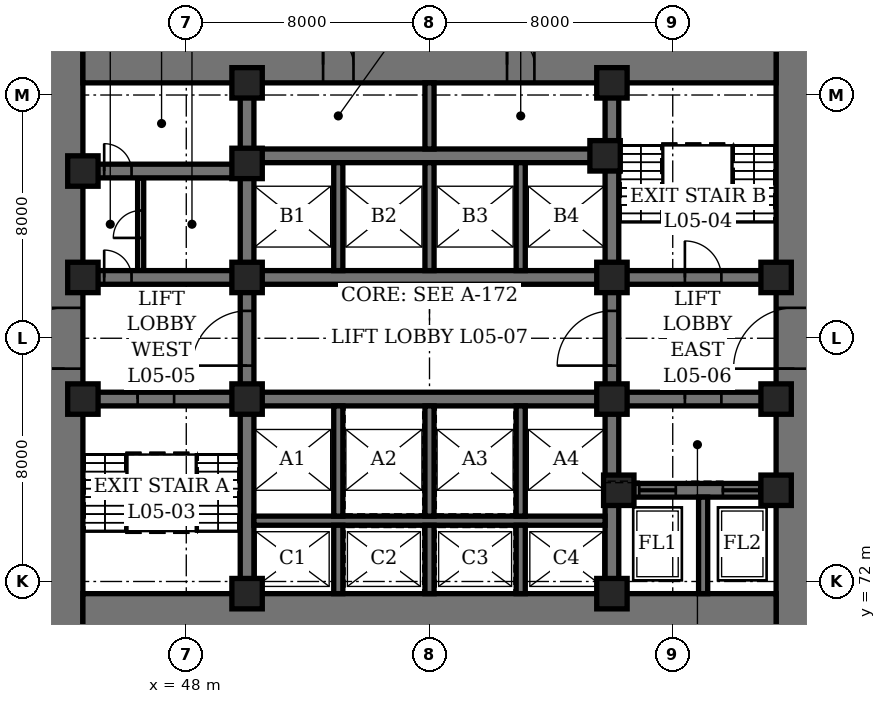
"""IFC4 building model, lengths in metres.
Left out: names, types, materials, properties, quantities, classifications, styles, units other than length and angle.
Written with IfcOpenShell. Run it as: python <this file> out.ifc"""

import sys

from ifc_helpers import new_model, si_unit, direction, frame, frame_2d, origin, origin_2d, place, context, subcontext, project, spatial, rectangle, hollow_rectangle, extrude, element, fill, save


model = new_model("IFC4")
c1 = context("Model", 3, precision=1e-05, world=origin(), true_north=direction((0.0, 1.0)))
c2 = subcontext(c1, "Body", "Model", "MODEL_VIEW")
j1 = project(units=[si_unit("LENGTHUNIT", "METRE"), si_unit("PLANEANGLEUNIT", "RADIAN")], contexts=[c1])
p1 = place(None, origin())
s1 = spatial("IfcSite", under=j1, at=p1, CompositionType="ELEMENT")
p2 = place(p1, origin())
s2 = spatial("IfcBuilding", under=s1, at=p2, CompositionType="ELEMENT")
p3 = place(p2, frame((0.0, 0.0, 25.9)))
s3 = spatial("IfcBuildingStorey", under=s2, at=p3, CompositionType="ELEMENT", Elevation=25.9)
p4 = place(p3, frame((44.0, 70.4, 0.0), z_axis=(0.0, 0.0, 1.0), x_axis=(0.0, 1.0, 0.0)))
e1 = element("IfcWall", 1, at=p4, inside=s3, PredefinedType="SHEAR", context=c2, shape_type="SweptSolid", body=[
    extrude(rectangle(XDim=19.2, YDim=1.2, at=frame_2d((9.6, 0.0))), origin(), (0.0, 0.0, 1.0), 9.0),
])
p5 = place(p4, frame((8.6, 0.0, 0.0)))
e2 = element("IfcOpeningElement", 2, at=p5, cuts=e1, PredefinedType="OPENING", context=c2, shape_type="SweptSolid", body=[
    extrude(rectangle(XDim=2.0, YDim=2.4, at=frame_2d((1.0, 1.2))), frame((0.0, 0.61, 0.0), z_axis=(0.0, -1.0, 0.0), x_axis=(1.0, 0.0, 0.0)), (0.0, 0.0, 1.0), 1.22),
])
p6 = place(p3, frame((68.0, 70.4, 0.0), z_axis=(0.0, 0.0, 1.0), x_axis=(0.0, 1.0, 0.0)))
e3 = element("IfcWall", 3, at=p6, inside=s3, PredefinedType="SHEAR", context=c2, shape_type="SweptSolid", body=[
    extrude(rectangle(XDim=19.2, YDim=1.2, at=frame_2d((9.6, 0.0))), origin(), (0.0, 0.0, 1.0), 9.0),
])
p7 = place(p6, frame((8.6, 0.0, 0.0)))
e4 = element("IfcOpeningElement", 4, at=p7, cuts=e3, PredefinedType="OPENING", context=c2, shape_type="SweptSolid", body=[
    extrude(rectangle(XDim=2.0, YDim=2.4, at=frame_2d((1.0, 1.2))), frame((0.0, 0.61, 0.0), z_axis=(0.0, -1.0, 0.0), x_axis=(1.0, 0.0, 0.0)), (0.0, 0.0, 1.0), 1.22),
])
p8 = place(p3, frame((44.6, 71.0, 0.0), z_axis=(0.0, 0.0, 1.0), x_axis=(1.0, 0.0, 0.0)))
e5 = element("IfcWall", 5, at=p8, inside=s3, PredefinedType="SHEAR", context=c2, shape_type="SweptSolid", body=[
    extrude(rectangle(XDim=22.8, YDim=1.2, at=frame_2d((11.4, 0.0))), origin(), (0.0, 0.0, 1.0), 9.0),
])
p9 = place(p3, frame((44.6, 89.0, 0.0), z_axis=(0.0, 0.0, 1.0), x_axis=(1.0, 0.0, 0.0)))
e6 = element("IfcWall", 6, at=p9, inside=s3, PredefinedType="SHEAR", context=c2, shape_type="SweptSolid", body=[
    extrude(rectangle(XDim=22.8, YDim=1.2, at=frame_2d((11.4, 0.0))), origin(), (0.0, 0.0, 1.0), 9.0),
])
p10 = place(p9, frame((7.9, 0.0, 0.0)))
e7 = element("IfcOpeningElement", 7, at=p10, cuts=e6, PredefinedType="OPENING", context=c2, shape_type="SweptSolid", body=[
    extrude(rectangle(XDim=1.0, YDim=2.1, at=frame_2d((0.5, 1.05))), frame((0.0, 0.61, 0.0), z_axis=(0.0, -1.0, 0.0), x_axis=(1.0, 0.0, 0.0)), (0.0, 0.0, 1.0), 1.22),
])
p11 = place(p9, frame((13.95, 0.0, 0.0)))
e8 = element("IfcOpeningElement", 8, at=p11, cuts=e6, PredefinedType="OPENING", context=c2, shape_type="SweptSolid", body=[
    extrude(rectangle(XDim=0.9, YDim=2.1, at=frame_2d((0.45, 1.05))), frame((0.0, 0.61, 0.0), z_axis=(0.0, -1.0, 0.0), x_axis=(1.0, 0.0, 0.0)), (0.0, 0.0, 1.0), 1.22),
])
p12 = place(p3, frame((50.0, 71.6, 0.0), z_axis=(0.0, 0.0, 1.0), x_axis=(0.0, 1.0, 0.0)))
e9 = element("IfcWall", 9, at=p12, inside=s3, PredefinedType="SHEAR", context=c2, shape_type="SweptSolid", body=[
    extrude(rectangle(XDim=16.8, YDim=0.45, at=frame_2d((8.4, 0.0))), origin(), (0.0, 0.0, 1.0), 9.0),
])
p13 = place(p12, frame((7.5, 0.0, 0.0)))
e10 = element("IfcOpeningElement", 10, at=p13, cuts=e9, PredefinedType="OPENING", context=c2, shape_type="SweptSolid", body=[
    extrude(rectangle(XDim=1.8, YDim=2.4, at=frame_2d((0.9, 1.2))), frame((0.0, 0.235, 0.0), z_axis=(0.0, -1.0, 0.0), x_axis=(1.0, 0.0, 0.0)), (0.0, 0.0, 1.0), 0.47),
])
p14 = place(p3, frame((62.0, 71.6, 0.0), z_axis=(0.0, 0.0, 1.0), x_axis=(0.0, 1.0, 0.0)))
e11 = element("IfcWall", 11, at=p14, inside=s3, PredefinedType="SHEAR", context=c2, shape_type="SweptSolid", body=[
    extrude(rectangle(XDim=16.8, YDim=0.45, at=frame_2d((8.4, 0.0))), origin(), (0.0, 0.0, 1.0), 9.0),
])
p15 = place(p14, frame((7.5, 0.0, 0.0)))
e12 = element("IfcOpeningElement", 12, at=p15, cuts=e11, PredefinedType="OPENING", context=c2, shape_type="SweptSolid", body=[
    extrude(rectangle(XDim=1.8, YDim=2.4, at=frame_2d((0.9, 1.2))), frame((0.0, 0.235, 0.0), z_axis=(0.0, -1.0, 0.0), x_axis=(1.0, 0.0, 0.0)), (0.0, 0.0, 1.0), 0.47),
])
p16 = place(p3, frame((44.6, 78.0, 0.0), z_axis=(0.0, 0.0, 1.0), x_axis=(1.0, 0.0, 0.0)))
e13 = element("IfcWall", 13, at=p16, inside=s3, PredefinedType="SHEAR", context=c2, shape_type="SweptSolid", body=[
    extrude(rectangle(XDim=5.175, YDim=0.45, at=frame_2d((2.587, 0.0))), origin(), (0.0, 0.0, 1.0), 9.0),
])
p17 = place(p16, frame((1.8, 0.0, 0.0)))
e14 = element("IfcOpeningElement", 14, at=p17, cuts=e13, PredefinedType="OPENING", context=c2, shape_type="SweptSolid", body=[
    extrude(rectangle(XDim=1.2, YDim=2.1, at=frame_2d((0.6, 1.05))), frame((0.0, 0.235, 0.0), z_axis=(0.0, -1.0, 0.0), x_axis=(1.0, 0.0, 0.0)), (0.0, 0.0, 1.0), 0.47),
])
p18 = place(p3, frame((44.6, 82.0, 0.0), z_axis=(0.0, 0.0, 1.0), x_axis=(1.0, 0.0, 0.0)))
e15 = element("IfcWall", 15, at=p18, inside=s3, PredefinedType="SHEAR", context=c2, shape_type="SweptSolid", body=[
    extrude(rectangle(XDim=5.175, YDim=0.45, at=frame_2d((2.587, 0.0))), origin(), (0.0, 0.0, 1.0), 9.0),
])
p19 = place(p18, frame((0.7, 0.0, 0.0)))
e16 = element("IfcOpeningElement", 16, at=p19, cuts=e15, PredefinedType="OPENING", context=c2, shape_type="SweptSolid", body=[
    extrude(rectangle(XDim=0.9, YDim=2.1, at=frame_2d((0.45, 1.05))), frame((0.0, 0.235, 0.0), z_axis=(0.0, -1.0, 0.0), x_axis=(1.0, 0.0, 0.0)), (0.0, 0.0, 1.0), 0.47),
])
p20 = place(p3, frame((44.6, 85.5, 0.0), z_axis=(0.0, 0.0, 1.0), x_axis=(1.0, 0.0, 0.0)))
e17 = element("IfcWall", 17, at=p20, inside=s3, PredefinedType="SHEAR", context=c2, shape_type="SweptSolid", body=[
    extrude(rectangle(XDim=5.175, YDim=0.45, at=frame_2d((2.587, 0.0))), origin(), (0.0, 0.0, 1.0), 9.0),
])
p21 = place(p20, frame((0.7, 0.0, 0.0)))
e18 = element("IfcOpeningElement", 18, at=p21, cuts=e17, PredefinedType="OPENING", context=c2, shape_type="SweptSolid", body=[
    extrude(rectangle(XDim=0.9, YDim=2.1, at=frame_2d((0.45, 1.05))), frame((0.0, 0.235, 0.0), z_axis=(0.0, -1.0, 0.0), x_axis=(1.0, 0.0, 0.0)), (0.0, 0.0, 1.0), 0.47),
])
p22 = place(p3, frame((62.225, 75.0, 0.0), z_axis=(0.0, 0.0, 1.0), x_axis=(1.0, 0.0, 0.0)))
e19 = element("IfcWall", 19, at=p22, inside=s3, PredefinedType="SHEAR", context=c2, shape_type="SweptSolid", body=[
    extrude(rectangle(XDim=5.175, YDim=0.45, at=frame_2d((2.587, 0.0))), origin(), (0.0, 0.0, 1.0), 9.0),
])
p23 = place(p22, frame((0.675, 0.0, 0.0)))
e20 = element("IfcOpeningElement", 20, at=p23, cuts=e19, PredefinedType="OPENING", context=c2, shape_type="SweptSolid", body=[
    extrude(rectangle(XDim=1.2, YDim=2.2, at=frame_2d((0.6, 1.1))), frame((0.0, 0.235, 0.0), z_axis=(0.0, -1.0, 0.0), x_axis=(1.0, 0.0, 0.0)), (0.0, 0.0, 1.0), 0.47),
])
p24 = place(p22, frame((3.425, 0.0, 0.0)))
e21 = element("IfcOpeningElement", 21, at=p24, cuts=e19, PredefinedType="OPENING", context=c2, shape_type="SweptSolid", body=[
    extrude(rectangle(XDim=1.2, YDim=2.2, at=frame_2d((0.6, 1.1))), frame((0.0, 0.235, 0.0), z_axis=(0.0, -1.0, 0.0), x_axis=(1.0, 0.0, 0.0)), (0.0, 0.0, 1.0), 0.47),
])
p25 = place(p3, frame((62.225, 78.0, 0.0), z_axis=(0.0, 0.0, 1.0), x_axis=(1.0, 0.0, 0.0)))
e22 = element("IfcWall", 22, at=p25, inside=s3, PredefinedType="SHEAR", context=c2, shape_type="SweptSolid", body=[
    extrude(rectangle(XDim=5.175, YDim=0.45, at=frame_2d((2.587, 0.0))), origin(), (0.0, 0.0, 1.0), 9.0),
])
p26 = place(p25, frame((2.175, 0.0, 0.0)))
e23 = element("IfcOpeningElement", 23, at=p26, cuts=e22, PredefinedType="OPENING", context=c2, shape_type="SweptSolid", body=[
    extrude(rectangle(XDim=1.2, YDim=2.1, at=frame_2d((0.6, 1.05))), frame((0.0, 0.235, 0.0), z_axis=(0.0, -1.0, 0.0), x_axis=(1.0, 0.0, 0.0)), (0.0, 0.0, 1.0), 0.47),
])
p27 = place(p3, frame((62.225, 82.0, 0.0), z_axis=(0.0, 0.0, 1.0), x_axis=(1.0, 0.0, 0.0)))
e24 = element("IfcWall", 24, at=p27, inside=s3, PredefinedType="SHEAR", context=c2, shape_type="SweptSolid", body=[
    extrude(rectangle(XDim=5.175, YDim=0.45, at=frame_2d((2.587, 0.0))), origin(), (0.0, 0.0, 1.0), 9.0),
])
p28 = place(p27, frame((2.175, 0.0, 0.0)))
e25 = element("IfcOpeningElement", 25, at=p28, cuts=e24, PredefinedType="OPENING", context=c2, shape_type="SweptSolid", body=[
    extrude(rectangle(XDim=1.2, YDim=2.1, at=frame_2d((0.6, 1.05))), frame((0.0, 0.235, 0.0), z_axis=(0.0, -1.0, 0.0), x_axis=(1.0, 0.0, 0.0)), (0.0, 0.0, 1.0), 0.47),
])
for number, where, z_axis, x_axis in (
    (26, (50.225, 78.0, 0.0), (0.0, 0.0, 1.0), (1.0, 0.0, 0.0)),
    (27, (50.225, 82.0, 0.0), (0.0, 0.0, 1.0), (1.0, 0.0, 0.0)),
    (28, (50.225, 86.0, 0.0), (0.0, 0.0, 1.0), (1.0, 0.0, 0.0)),
):
    element("IfcWall", number, at=place(p3, frame(where, z_axis=z_axis, x_axis=x_axis)), inside=s3, PredefinedType="SHEAR", context=c2, shape_type="SweptSolid", body=[
        extrude(rectangle(XDim=11.55, YDim=0.45, at=frame_2d((5.775, 0.0))), origin(), (0.0, 0.0, 1.0), 9.0),
    ])
p29 = place(p3, frame((50.225, 74.0, 0.0), z_axis=(0.0, 0.0, 1.0), x_axis=(1.0, 0.0, 0.0)))
e29 = element("IfcWall", 29, at=p29, inside=s3, PredefinedType="SHEAR", context=c2, shape_type="SweptSolid", body=[
    extrude(rectangle(XDim=11.55, YDim=0.3, at=frame_2d((5.775, 0.0))), origin(), (0.0, 0.0, 1.0), 9.0),
])
p30 = place(p3, frame((53.0, 71.6, 0.0), z_axis=(0.0, 0.0, 1.0), x_axis=(0.0, 1.0, 0.0)))
e30 = element("IfcWall", 30, at=p30, inside=s3, PredefinedType="SHEAR", context=c2, shape_type="SweptSolid", body=[
    extrude(rectangle(XDim=2.25, YDim=0.3, at=frame_2d((1.125, 0.0))), origin(), (0.0, 0.0, 1.0), 9.0),
])
p31 = place(p3, frame((53.0, 74.15, 0.0), z_axis=(0.0, 0.0, 1.0), x_axis=(0.0, 1.0, 0.0)))
e31 = element("IfcWall", 31, at=p31, inside=s3, PredefinedType="SHEAR", context=c2, shape_type="SweptSolid", body=[
    extrude(rectangle(XDim=3.625, YDim=0.3, at=frame_2d((1.812, 0.0))), origin(), (0.0, 0.0, 1.0), 9.0),
])
p32 = place(p3, frame((53.0, 82.225, 0.0), z_axis=(0.0, 0.0, 1.0), x_axis=(0.0, 1.0, 0.0)))
e32 = element("IfcWall", 32, at=p32, inside=s3, PredefinedType="SHEAR", context=c2, shape_type="SweptSolid", body=[
    extrude(rectangle(XDim=3.55, YDim=0.3, at=frame_2d((1.775, 0.0))), origin(), (0.0, 0.0, 1.0), 9.0),
])
p33 = place(p3, frame((56.0, 71.6, 0.0), z_axis=(0.0, 0.0, 1.0), x_axis=(0.0, 1.0, 0.0)))
e33 = element("IfcWall", 33, at=p33, inside=s3, PredefinedType="SHEAR", context=c2, shape_type="SweptSolid", body=[
    extrude(rectangle(XDim=2.25, YDim=0.3, at=frame_2d((1.125, 0.0))), origin(), (0.0, 0.0, 1.0), 9.0),
])
p34 = place(p3, frame((56.0, 74.15, 0.0), z_axis=(0.0, 0.0, 1.0), x_axis=(0.0, 1.0, 0.0)))
e34 = element("IfcWall", 34, at=p34, inside=s3, PredefinedType="SHEAR", context=c2, shape_type="SweptSolid", body=[
    extrude(rectangle(XDim=3.625, YDim=0.3, at=frame_2d((1.812, 0.0))), origin(), (0.0, 0.0, 1.0), 9.0),
])
p35 = place(p3, frame((56.0, 82.225, 0.0), z_axis=(0.0, 0.0, 1.0), x_axis=(0.0, 1.0, 0.0)))
e35 = element("IfcWall", 35, at=p35, inside=s3, PredefinedType="SHEAR", context=c2, shape_type="SweptSolid", body=[
    extrude(rectangle(XDim=3.55, YDim=0.3, at=frame_2d((1.775, 0.0))), origin(), (0.0, 0.0, 1.0), 9.0),
])
p36 = place(p3, frame((59.0, 71.6, 0.0), z_axis=(0.0, 0.0, 1.0), x_axis=(0.0, 1.0, 0.0)))
e36 = element("IfcWall", 36, at=p36, inside=s3, PredefinedType="SHEAR", context=c2, shape_type="SweptSolid", body=[
    extrude(rectangle(XDim=2.25, YDim=0.3, at=frame_2d((1.125, 0.0))), origin(), (0.0, 0.0, 1.0), 9.0),
])
p37 = place(p3, frame((59.0, 74.15, 0.0), z_axis=(0.0, 0.0, 1.0), x_axis=(0.0, 1.0, 0.0)))
e37 = element("IfcWall", 37, at=p37, inside=s3, PredefinedType="SHEAR", context=c2, shape_type="SweptSolid", body=[
    extrude(rectangle(XDim=3.625, YDim=0.3, at=frame_2d((1.812, 0.0))), origin(), (0.0, 0.0, 1.0), 9.0),
])
p38 = place(p3, frame((59.0, 82.225, 0.0), z_axis=(0.0, 0.0, 1.0), x_axis=(0.0, 1.0, 0.0)))
e38 = element("IfcWall", 38, at=p38, inside=s3, PredefinedType="SHEAR", context=c2, shape_type="SweptSolid", body=[
    extrude(rectangle(XDim=3.55, YDim=0.3, at=frame_2d((1.775, 0.0))), origin(), (0.0, 0.0, 1.0), 9.0),
])
p39 = place(p3, frame((65.0, 71.6, 0.0), z_axis=(0.0, 0.0, 1.0), x_axis=(0.0, 1.0, 0.0)))
e39 = element("IfcWall", 39, at=p39, inside=s3, PredefinedType="SHEAR", context=c2, shape_type="SweptSolid", body=[
    extrude(rectangle(XDim=3.175, YDim=0.3, at=frame_2d((1.587, 0.0))), origin(), (0.0, 0.0, 1.0), 9.0),
])
p40 = place(p3, frame((56.0, 86.225, 0.0), z_axis=(0.0, 0.0, 1.0), x_axis=(0.0, 1.0, 0.0)))
e40 = element("IfcWall", 40, at=p40, inside=s3, PredefinedType="SHEAR", context=c2, shape_type="SweptSolid", body=[
    extrude(rectangle(XDim=2.175, YDim=0.3, at=frame_2d((1.087, 0.0))), origin(), (0.0, 0.0, 1.0), 9.0),
])
for number, where, z_axis, x_axis in (
    (41, (44.6, 78.0, 0.0), (0.0, 0.0, 1.0), (1.0, 0.0, 0.0)),
    (42, (44.6, 82.0, 0.0), (0.0, 0.0, 1.0), (1.0, 0.0, 0.0)),
    (43, (44.6, 85.5, 0.0), (0.0, 0.0, 1.0), (1.0, 0.0, 0.0)),
    (44, (50.0, 71.6, 0.0), (0.0, 0.0, 1.0), (1.0, 0.0, 0.0)),
    (45, (50.0, 78.0, 0.0), (0.0, 0.0, 1.0), (1.0, 0.0, 0.0)),
    (46, (50.0, 82.0, 0.0), (0.0, 0.0, 1.0), (1.0, 0.0, 0.0)),
    (47, (50.0, 85.75, 0.0), (0.0, 0.0, 1.0), (1.0, 0.0, 0.0)),
    (48, (50.0, 88.4, 0.0), (0.0, 0.0, 1.0), (1.0, 0.0, 0.0)),
    (49, (61.775, 86.0, 0.0), (0.0, 0.0, 1.0), (1.0, 0.0, 0.0)),
    (50, (62.0, 71.6, 0.0), (0.0, 0.0, 1.0), (1.0, 0.0, 0.0)),
    (51, (62.0, 78.0, 0.0), (0.0, 0.0, 1.0), (1.0, 0.0, 0.0)),
    (52, (62.0, 82.0, 0.0), (0.0, 0.0, 1.0), (1.0, 0.0, 0.0)),
    (53, (62.0, 88.4, 0.0), (0.0, 0.0, 1.0), (1.0, 0.0, 0.0)),
    (54, (62.225, 75.0, 0.0), (0.0, 0.0, 1.0), (1.0, 0.0, 0.0)),
    (55, (67.4, 75.0, 0.0), (0.0, 0.0, 1.0), (1.0, 0.0, 0.0)),
    (56, (67.4, 78.0, 0.0), (0.0, 0.0, 1.0), (1.0, 0.0, 0.0)),
    (57, (67.4, 82.0, 0.0), (0.0, 0.0, 1.0), (1.0, 0.0, 0.0)),
):
    element("IfcColumn", number, at=place(p3, frame(where, z_axis=z_axis, x_axis=x_axis)), inside=s3, PredefinedType="COLUMN", context=c2, shape_type="SweptSolid", body=[
        extrude(hollow_rectangle(XDim=1.0, YDim=1.0, WallThickness=0.15, at=origin_2d()), origin(), (0.0, 0.0, 1.0), 9.0),
    ])
p41 = place(p3, frame((46.5, 82.225, 0.0), z_axis=(0.0, 0.0, 1.0), x_axis=(0.0, 1.0, 0.0)))
e58 = element("IfcWall", 58, at=p41, inside=s3, PredefinedType="PARTITIONING", context=c2, shape_type="SweptSolid", body=[
    extrude(rectangle(XDim=3.05, YDim=0.2, at=frame_2d((1.525, 0.0))), origin(), (0.0, 0.0, 1.0), 8.7),
])
p42 = place(p41, frame((1.075, 0.0, 0.0)))
e59 = element("IfcOpeningElement", 59, at=p42, cuts=e58, PredefinedType="OPENING", context=c2, shape_type="SweptSolid", body=[
    extrude(rectangle(XDim=0.9, YDim=2.1, at=frame_2d((0.45, 1.05))), frame((0.0, 0.11, 0.0), z_axis=(0.0, -1.0, 0.0), x_axis=(1.0, 0.0, 0.0)), (0.0, 0.0, 1.0), 0.22),
])
p43 = place(p19, origin())
e60 = element("IfcDoor", 60, at=p43, inside=s3, OperationType="SINGLE_SWING_LEFT", PredefinedType="DOOR", context=c2, shape_type="SweptSolid", body=[
    extrude(rectangle(XDim=0.9, YDim=2.1, at=frame_2d((0.45, 1.05))), frame((0.0, 0.225, 0.0), z_axis=(0.0, -1.0, 0.0), x_axis=(1.0, 0.0, 0.0)), (0.0, 0.0, 1.0), 0.449),
])
fill(e16, e60)
p44 = place(p42, origin())
e61 = element("IfcDoor", 61, at=p44, inside=s3, OperationType="SINGLE_SWING_RIGHT", PredefinedType="DOOR", context=c2, shape_type="SweptSolid", body=[
    extrude(rectangle(XDim=0.9, YDim=2.1, at=frame_2d((0.45, 1.05))), frame((0.0, 0.1, 0.0), z_axis=(0.0, -1.0, 0.0), x_axis=(1.0, 0.0, 0.0)), (0.0, 0.0, 1.0), 0.199),
])
fill(e59, e61)
p45 = place(p21, origin())
e62 = element("IfcDoor", 62, at=p45, inside=s3, OperationType="SINGLE_SWING_RIGHT", PredefinedType="DOOR", context=c2, shape_type="SweptSolid", body=[
    extrude(rectangle(XDim=0.9, YDim=2.1, at=frame_2d((0.45, 1.05))), frame((0.0, 0.225, 0.0), z_axis=(0.0, -1.0, 0.0), x_axis=(1.0, 0.0, 0.0)), (0.0, 0.0, 1.0), 0.449),
])
fill(e18, e62)
p46 = place(p10, origin())
e63 = element("IfcDoor", 63, at=p46, inside=s3, OperationType="SINGLE_SWING_LEFT", PredefinedType="DOOR", context=c2, shape_type="SweptSolid", body=[
    extrude(rectangle(XDim=1.0, YDim=2.1, at=frame_2d((0.5, 1.05))), frame((0.0, 0.35, 0.0), z_axis=(0.0, -1.0, 0.0), x_axis=(1.0, 0.0, 0.0)), (0.0, 0.0, 1.0), 0.7),
])
fill(e7, e63)
p47 = place(p11, origin())
e64 = element("IfcDoor", 64, at=p47, inside=s3, OperationType="SINGLE_SWING_LEFT", PredefinedType="DOOR", context=c2, shape_type="SweptSolid", body=[
    extrude(rectangle(XDim=0.9, YDim=2.1, at=frame_2d((0.45, 1.05))), frame((0.0, 0.35, 0.0), z_axis=(0.0, -1.0, 0.0), x_axis=(1.0, 0.0, 0.0)), (0.0, 0.0, 1.0), 0.7),
])
fill(e8, e64)
p48 = place(p17, origin())
e65 = element("IfcDoor", 65, at=p48, inside=s3, OperationType="SINGLE_SWING_LEFT", PredefinedType="DOOR", context=c2, shape_type="SweptSolid", body=[
    extrude(rectangle(XDim=1.2, YDim=2.1, at=frame_2d((0.6, 1.05))), frame((0.0, 0.225, 0.0), z_axis=(0.0, -1.0, 0.0), x_axis=(1.0, 0.0, 0.0)), (0.0, 0.0, 1.0), 0.449),
])
fill(e14, e65)
p49 = place(p28, origin())
e66 = element("IfcDoor", 66, at=p49, inside=s3, OperationType="SINGLE_SWING_LEFT", PredefinedType="DOOR", context=c2, shape_type="SweptSolid", body=[
    extrude(rectangle(XDim=1.2, YDim=2.1, at=frame_2d((0.6, 1.05))), frame((0.0, 0.225, 0.0), z_axis=(0.0, -1.0, 0.0), x_axis=(1.0, 0.0, 0.0)), (0.0, 0.0, 1.0), 0.449),
])
fill(e25, e66)
p50 = place(p5, origin())
e67 = element("IfcDoor", 67, at=p50, inside=s3, OperationType="DOUBLE_DOOR_SINGLE_SWING", PredefinedType="DOOR", context=c2, shape_type="SweptSolid", body=[
    extrude(rectangle(XDim=2.0, YDim=2.4, at=frame_2d((1.0, 1.2))), frame((0.0, 0.35, 0.0), z_axis=(0.0, -1.0, 0.0), x_axis=(1.0, 0.0, 0.0)), (0.0, 0.0, 1.0), 0.7),
])
fill(e2, e67)
p51 = place(p7, origin())
e68 = element("IfcDoor", 68, at=p51, inside=s3, OperationType="DOUBLE_DOOR_SINGLE_SWING", PredefinedType="DOOR", context=c2, shape_type="SweptSolid", body=[
    extrude(rectangle(XDim=2.0, YDim=2.4, at=frame_2d((1.0, 1.2))), frame((0.0, 0.35, 0.0), z_axis=(0.0, -1.0, 0.0), x_axis=(1.0, 0.0, 0.0)), (0.0, 0.0, 1.0), 0.7),
])
fill(e4, e68)
p52 = place(p13, origin())
e69 = element("IfcDoor", 69, at=p52, inside=s3, OperationType="DOUBLE_DOOR_SINGLE_SWING", PredefinedType="DOOR", context=c2, shape_type="SweptSolid", body=[
    extrude(rectangle(XDim=1.8, YDim=2.4, at=frame_2d((0.9, 1.2))), frame((0.0, 0.225, 0.0), z_axis=(0.0, -1.0, 0.0), x_axis=(1.0, 0.0, 0.0)), (0.0, 0.0, 1.0), 0.449),
])
fill(e10, e69)
p53 = place(p15, origin())
e70 = element("IfcDoor", 70, at=p53, inside=s3, OperationType="DOUBLE_DOOR_SINGLE_SWING", PredefinedType="DOOR", context=c2, shape_type="SweptSolid", body=[
    extrude(rectangle(XDim=1.8, YDim=2.4, at=frame_2d((0.9, 1.2))), frame((0.0, 0.225, 0.0), z_axis=(0.0, -1.0, 0.0), x_axis=(1.0, 0.0, 0.0)), (0.0, 0.0, 1.0), 0.449),
])
fill(e12, e70)
p54 = place(p26, origin())
e71 = element("IfcDoor", 71, at=p54, inside=s3, OperationType="SINGLE_SWING_RIGHT", PredefinedType="DOOR", context=c2, shape_type="SweptSolid", body=[
    extrude(rectangle(XDim=1.2, YDim=2.1, at=frame_2d((0.6, 1.05))), frame((0.0, 0.225, 0.0), z_axis=(0.0, -1.0, 0.0), x_axis=(1.0, 0.0, 0.0)), (0.0, 0.0, 1.0), 0.449),
])
fill(e23, e71)
p55 = place(p23, origin())
e72 = element("IfcDoor", 72, at=p55, inside=s3, OperationType="SLIDING_TO_LEFT", PredefinedType="DOOR", context=c2, shape_type="SweptSolid", body=[
    extrude(rectangle(XDim=1.2, YDim=2.2, at=frame_2d((0.6, 1.1))), frame((0.0, 0.225, 0.0), z_axis=(0.0, -1.0, 0.0), x_axis=(1.0, 0.0, 0.0)), (0.0, 0.0, 1.0), 0.449),
])
fill(e20, e72)
p56 = place(p24, origin())
e73 = element("IfcDoor", 73, at=p56, inside=s3, OperationType="SLIDING_TO_LEFT", PredefinedType="DOOR", context=c2, shape_type="SweptSolid", body=[
    extrude(rectangle(XDim=1.2, YDim=2.2, at=frame_2d((0.6, 1.1))), frame((0.0, 0.225, 0.0), z_axis=(0.0, -1.0, 0.0), x_axis=(1.0, 0.0, 0.0)), (0.0, 0.0, 1.0), 0.449),
])
fill(e21, e73)
save(model, sys.argv[1])
